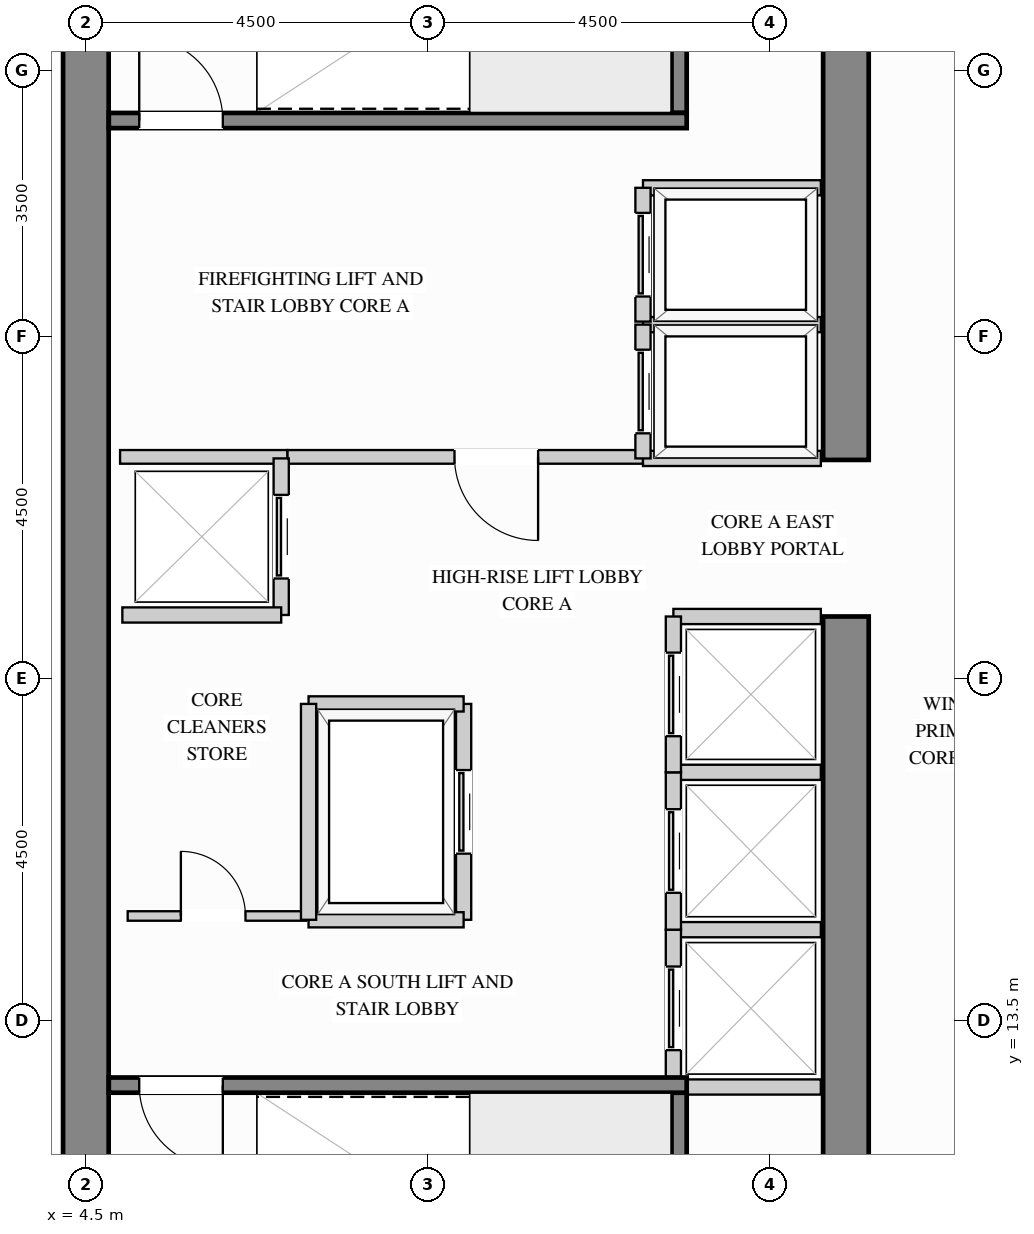
"""IFC4 building model, lengths in metres.
Left out: names, types, materials, properties, quantities, classifications, styles, units other than length and angle.
Written with IfcOpenShell. Run it as: python <this file> out.ifc"""

import sys

from ifc_helpers import new_model, si_unit, direction, frame, frame_2d, origin, place, context, subcontext, project, spatial, rectangle, extrude, source, transform, mapped, element, fill, save


model = new_model("IFC4")
c1 = context("Model", 3, precision=1e-05, world=origin(), true_north=direction((0.0, 1.0)))
c2 = subcontext(c1, "Body", "Model", "MODEL_VIEW")
j1 = project(units=[si_unit("LENGTHUNIT", "METRE"), si_unit("PLANEANGLEUNIT", "RADIAN")], contexts=[c1])
p1 = place(None, origin())
s1 = spatial("IfcSite", under=j1, at=p1, CompositionType="ELEMENT")
p2 = place(p1, origin())
s2 = spatial("IfcBuilding", under=s1, at=p2, CompositionType="ELEMENT")
p3 = place(p2, frame((0.0, 0.0, 157.5)))
s3 = spatial("IfcBuildingStorey", under=s2, at=p3, CompositionType="ELEMENT", Elevation=157.5)
m1 = source(origin(), c2, "Body", "SweptSolid", [
    extrude(rectangle(XDim=10.02, YDim=0.6, at=frame_2d((5.01, 0.0))), origin(), (0.0, 0.0, 1.0), 3.4),
])
p4 = place(p3, frame((14.5, 8.8, 0.0), z_axis=(0.0, 0.0, 1.0), x_axis=(0.0, 1.0, 0.0)))
e1 = element("IfcWall", 1, at=p4, inside=s3, PredefinedType="SHEAR", context=c2, shape_type="MappedRepresentation", body=[
    mapped(m1, transform((0.0, 0.0, 0.0), x_axis=(1.0, 0.0, 0.0), y_axis=(0.0, 1.0, 0.0), z_axis=(0.0, 0.0, 1.0))),
])
m2 = source(origin(), c2, "Body", "SweptSolid", [
    extrude(rectangle(XDim=8.32, YDim=0.6, at=frame_2d((4.16, 0.0))), origin(), (0.0, 0.0, 1.0), 3.4),
])
p5 = place(p3, frame((14.5, 20.88, 0.0), z_axis=(0.0, 0.0, 1.0), x_axis=(0.0, 1.0, 0.0)))
e2 = element("IfcWall", 2, at=p5, inside=s3, PredefinedType="SHEAR", context=c2, shape_type="MappedRepresentation", body=[
    mapped(m2, transform((0.0, 0.0, 0.0), x_axis=(1.0, 0.0, 0.0), y_axis=(0.0, 1.0, 0.0), z_axis=(0.0, 0.0, 1.0))),
])
m3 = source(origin(), c2, "Body", "SweptSolid", [
    extrude(rectangle(XDim=20.4, YDim=0.6, at=frame_2d((10.2, 0.0))), origin(), (0.0, 0.0, 1.0), 3.4),
])
p6 = place(p3, frame((4.5, 8.8, 0.0), z_axis=(0.0, 0.0, 1.0), x_axis=(0.0, 1.0, 0.0)))
e3 = element("IfcWall", 3, at=p6, inside=s3, PredefinedType="SHEAR", context=c2, shape_type="MappedRepresentation", body=[
    mapped(m3, transform((0.0, 0.0, 0.0), x_axis=(1.0, 0.0, 0.0), y_axis=(0.0, 1.0, 0.0), z_axis=(0.0, 0.0, 1.0))),
])
p7 = place(p3, frame((7.15, 20.92, 0.0), z_axis=(0.0, 0.0, 1.0), x_axis=(1.0, 0.0, 0.0)))
e4 = element("IfcWall", 4, at=p7, inside=s3, PredefinedType="PARTITIONING", context=c2, shape_type="SweptSolid", body=[
    extrude(rectangle(XDim=4.68, YDim=0.18, at=frame_2d((2.34, 0.0))), origin(), (0.0, 0.0, 1.0), 3.385),
])
p8 = place(p7, frame((2.2, 0.0, 0.0)))
e5 = element("IfcOpeningElement", 5, at=p8, cuts=e4, PredefinedType="OPENING", context=c2, shape_type="SweptSolid", body=[
    extrude(rectangle(XDim=1.1, YDim=2.15, at=frame_2d((0.55, 1.075))), frame((0.0, 0.1, 0.0), z_axis=(0.0, -1.0, 0.0), x_axis=(1.0, 0.0, 0.0)), (0.0, 0.0, 1.0), 0.2),
])
m4 = source(origin(), c2, "Body", "SweptSolid", [
    extrude(rectangle(XDim=2.2, YDim=0.18, at=frame_2d((1.1, 0.0))), origin(), (0.0, 0.0, 1.0), 3.385),
])
p9 = place(p3, frame((4.95, 20.92, 0.0), z_axis=(0.0, 0.0, 1.0), x_axis=(1.0, 0.0, 0.0)))
e6 = element("IfcWall", 6, at=p9, inside=s3, PredefinedType="PARTITIONING", context=c2, shape_type="MappedRepresentation", body=[
    mapped(m4, transform((0.0, 0.0, 0.0), x_axis=(1.0, 0.0, 0.0), y_axis=(0.0, 1.0, 0.0), z_axis=(0.0, 0.0, 1.0))),
])
p10 = place(p3, frame((5.05, 14.88, 0.0), z_axis=(0.0, 0.0, 1.0), x_axis=(1.0, 0.0, 0.0)))
e7 = element("IfcWall", 7, at=p10, inside=s3, PredefinedType="PARTITIONING", context=c2, shape_type="SweptSolid", body=[
    extrude(rectangle(XDim=2.35, YDim=0.125, at=frame_2d((1.175, 0.0))), origin(), (0.0, 0.0, 1.0), 3.385),
])
p11 = place(p10, frame((0.7, 0.0, 0.0)))
e8 = element("IfcOpeningElement", 8, at=p11, cuts=e7, PredefinedType="OPENING", context=c2, shape_type="SweptSolid", body=[
    extrude(rectangle(XDim=0.85, YDim=2.1, at=frame_2d((0.425, 1.05))), frame((0.0, 0.073, 0.0), z_axis=(0.0, -1.0, 0.0), x_axis=(1.0, 0.0, 0.0)), (0.0, 0.0, 1.0), 0.145),
])
m5 = source(origin(), c2, "Body", "SweptSolid", [
    extrude(rectangle(XDim=2.34, YDim=0.2, at=frame_2d((1.17, 0.0))), origin(), (0.0, 0.0, 1.0), 3.385),
])
for number, where, z_axis, x_axis in (
    (9, (11.83, 22.66, 0.0), (0.0, 0.0, 1.0), (1.0, 0.0, 0.0)),
    (10, (11.83, 20.9, 0.0), (0.0, 0.0, 1.0), (1.0, 0.0, 0.0)),
):
    element("IfcWall", number, at=place(p3, frame(where, z_axis=z_axis, x_axis=x_axis)), inside=s3, PredefinedType="PARTITIONING", context=c2, shape_type="MappedRepresentation", body=[
        mapped(m5, transform((0.0, 0.0, 0.0), x_axis=(1.0, 0.0, 0.0), y_axis=(0.0, 1.0, 0.0), z_axis=(0.0, 0.0, 1.0))),
    ])
p12 = place(p3, frame((11.83, 20.9, 0.0), z_axis=(0.0, 0.0, 1.0), x_axis=(0.0, 1.0, 0.0)))
e11 = element("IfcWall", 11, at=p12, inside=s3, PredefinedType="PARTITIONING", context=c2, shape_type="SweptSolid", body=[
    extrude(rectangle(XDim=1.76, YDim=0.2, at=frame_2d((0.88, 0.0))), origin(), (0.0, 0.0, 1.0), 3.385),
])
p13 = place(p12, frame((0.33, 0.0, 0.0)))
e12 = element("IfcOpeningElement", 12, at=p13, cuts=e11, PredefinedType="OPENING", context=c2, shape_type="SweptSolid", body=[
    extrude(rectangle(XDim=1.1, YDim=2.2, at=frame_2d((0.55, 1.1))), frame((0.0, 0.11, 0.0), z_axis=(0.0, -1.0, 0.0), x_axis=(1.0, 0.0, 0.0)), (0.0, 0.0, 1.0), 0.22),
])
p14 = place(p3, frame((11.83, 24.46, 0.0), z_axis=(0.0, 0.0, 1.0), x_axis=(1.0, 0.0, 0.0)))
e13 = element("IfcWall", 13, at=p14, inside=s3, PredefinedType="PARTITIONING", context=c2, shape_type="MappedRepresentation", body=[
    mapped(m5, transform((0.0, 0.0, 0.0), x_axis=(1.0, 0.0, 0.0), y_axis=(0.0, 1.0, 0.0), z_axis=(0.0, 0.0, 1.0))),
])
p15 = place(p3, frame((11.83, 22.7, 0.0), z_axis=(0.0, 0.0, 1.0), x_axis=(0.0, 1.0, 0.0)))
e14 = element("IfcWall", 14, at=p15, inside=s3, PredefinedType="PARTITIONING", context=c2, shape_type="SweptSolid", body=[
    extrude(rectangle(XDim=1.76, YDim=0.2, at=frame_2d((0.88, 0.0))), origin(), (0.0, 0.0, 1.0), 3.385),
])
p16 = place(p15, frame((0.33, 0.0, 0.0)))
e15 = element("IfcOpeningElement", 15, at=p16, cuts=e14, PredefinedType="OPENING", context=c2, shape_type="SweptSolid", body=[
    extrude(rectangle(XDim=1.1, YDim=2.2, at=frame_2d((0.55, 1.1))), frame((0.0, 0.11, 0.0), z_axis=(0.0, -1.0, 0.0), x_axis=(1.0, 0.0, 0.0)), (0.0, 0.0, 1.0), 0.22),
])
m6 = source(origin(), c2, "Body", "SweptSolid", [
    extrude(rectangle(XDim=1.94, YDim=0.2, at=frame_2d((0.97, 0.0))), origin(), (0.0, 0.0, 1.0), 3.385),
])
for number, where, z_axis, x_axis in (
    (16, (12.23, 14.7, 0.0), (0.0, 0.0, 1.0), (1.0, 0.0, 0.0)),
    (17, (12.23, 12.63, 0.0), (0.0, 0.0, 1.0), (1.0, 0.0, 0.0)),
):
    element("IfcWall", number, at=place(p3, frame(where, z_axis=z_axis, x_axis=x_axis)), inside=s3, PredefinedType="PARTITIONING", context=c2, shape_type="MappedRepresentation", body=[
        mapped(m6, transform((0.0, 0.0, 0.0), x_axis=(1.0, 0.0, 0.0), y_axis=(0.0, 1.0, 0.0), z_axis=(0.0, 0.0, 1.0))),
    ])
p17 = place(p3, frame((12.23, 12.63, 0.0), z_axis=(0.0, 0.0, 1.0), x_axis=(0.0, 1.0, 0.0)))
e18 = element("IfcWall", 18, at=p17, inside=s3, PredefinedType="PARTITIONING", context=c2, shape_type="SweptSolid", body=[
    extrude(rectangle(XDim=2.07, YDim=0.2, at=frame_2d((1.035, 0.0))), origin(), (0.0, 0.0, 1.0), 3.385),
])
p18 = place(p17, frame((0.485, 0.0, 0.0)))
e19 = element("IfcOpeningElement", 19, at=p18, cuts=e18, PredefinedType="OPENING", context=c2, shape_type="SweptSolid", body=[
    extrude(rectangle(XDim=1.1, YDim=2.2, at=frame_2d((0.55, 1.1))), frame((0.0, 0.11, 0.0), z_axis=(0.0, -1.0, 0.0), x_axis=(1.0, 0.0, 0.0)), (0.0, 0.0, 1.0), 0.22),
])
p19 = place(p3, frame((12.23, 16.77, 0.0), z_axis=(0.0, 0.0, 1.0), x_axis=(1.0, 0.0, 0.0)))
e20 = element("IfcWall", 20, at=p19, inside=s3, PredefinedType="PARTITIONING", context=c2, shape_type="MappedRepresentation", body=[
    mapped(m6, transform((0.0, 0.0, 0.0), x_axis=(1.0, 0.0, 0.0), y_axis=(0.0, 1.0, 0.0), z_axis=(0.0, 0.0, 1.0))),
])
p20 = place(p3, frame((12.23, 14.7, 0.0), z_axis=(0.0, 0.0, 1.0), x_axis=(0.0, 1.0, 0.0)))
e21 = element("IfcWall", 21, at=p20, inside=s3, PredefinedType="PARTITIONING", context=c2, shape_type="SweptSolid", body=[
    extrude(rectangle(XDim=2.07, YDim=0.2, at=frame_2d((1.035, 0.0))), origin(), (0.0, 0.0, 1.0), 3.385),
])
p21 = place(p20, frame((0.485, 0.0, 0.0)))
e22 = element("IfcOpeningElement", 22, at=p21, cuts=e21, PredefinedType="OPENING", context=c2, shape_type="SweptSolid", body=[
    extrude(rectangle(XDim=1.1, YDim=2.2, at=frame_2d((0.55, 1.1))), frame((0.0, 0.11, 0.0), z_axis=(0.0, -1.0, 0.0), x_axis=(1.0, 0.0, 0.0)), (0.0, 0.0, 1.0), 0.22),
])
p22 = place(p3, frame((12.23, 18.82, 0.0), z_axis=(0.0, 0.0, 1.0), x_axis=(1.0, 0.0, 0.0)))
e23 = element("IfcWall", 23, at=p22, inside=s3, PredefinedType="PARTITIONING", context=c2, shape_type="MappedRepresentation", body=[
    mapped(m6, transform((0.0, 0.0, 0.0), x_axis=(1.0, 0.0, 0.0), y_axis=(0.0, 1.0, 0.0), z_axis=(0.0, 0.0, 1.0))),
])
p23 = place(p3, frame((12.23, 16.77, 0.0), z_axis=(0.0, 0.0, 1.0), x_axis=(0.0, 1.0, 0.0)))
e24 = element("IfcWall", 24, at=p23, inside=s3, PredefinedType="PARTITIONING", context=c2, shape_type="SweptSolid", body=[
    extrude(rectangle(XDim=2.05, YDim=0.2, at=frame_2d((1.025, 0.0))), origin(), (0.0, 0.0, 1.0), 3.385),
])
p24 = place(p23, frame((0.475, 0.0, 0.0)))
e25 = element("IfcOpeningElement", 25, at=p24, cuts=e24, PredefinedType="OPENING", context=c2, shape_type="SweptSolid", body=[
    extrude(rectangle(XDim=1.1, YDim=2.2, at=frame_2d((0.55, 1.1))), frame((0.0, 0.11, 0.0), z_axis=(0.0, -1.0, 0.0), x_axis=(1.0, 0.0, 0.0)), (0.0, 0.0, 1.0), 0.22),
])
p25 = place(p3, frame((7.07, 18.84, 0.0), z_axis=(0.0, 0.0, 1.0), x_axis=(0.0, 1.0, 0.0)))
e26 = element("IfcWall", 26, at=p25, inside=s3, PredefinedType="PARTITIONING", context=c2, shape_type="SweptSolid", body=[
    extrude(rectangle(XDim=2.06, YDim=0.2, at=frame_2d((1.03, 0.0))), origin(), (0.0, 0.0, 1.0), 3.385),
])
p26 = place(p25, frame((0.48, 0.0, 0.0)))
e27 = element("IfcOpeningElement", 27, at=p26, cuts=e26, PredefinedType="OPENING", context=c2, shape_type="SweptSolid", body=[
    extrude(rectangle(XDim=1.1, YDim=2.2, at=frame_2d((0.55, 1.1))), frame((0.0, 0.11, 0.0), z_axis=(0.0, -1.0, 0.0), x_axis=(1.0, 0.0, 0.0)), (0.0, 0.0, 1.0), 0.22),
])
m7 = source(origin(), c2, "Body", "SweptSolid", [
    extrude(rectangle(XDim=2.09, YDim=0.2, at=frame_2d((1.045, 0.0))), origin(), (0.0, 0.0, 1.0), 3.385),
])
p27 = place(p3, frame((4.98, 18.84, 0.0), z_axis=(0.0, 0.0, 1.0), x_axis=(1.0, 0.0, 0.0)))
e28 = element("IfcWall", 28, at=p27, inside=s3, PredefinedType="PARTITIONING", context=c2, shape_type="MappedRepresentation", body=[
    mapped(m7, transform((0.0, 0.0, 0.0), x_axis=(1.0, 0.0, 0.0), y_axis=(0.0, 1.0, 0.0), z_axis=(0.0, 0.0, 1.0))),
])
p28 = place(p3, frame((9.47, 14.83, 0.0), z_axis=(0.0, 0.0, 1.0), x_axis=(0.0, 1.0, 0.0)))
e29 = element("IfcWall", 29, at=p28, inside=s3, PredefinedType="PARTITIONING", context=c2, shape_type="SweptSolid", body=[
    extrude(rectangle(XDim=2.84, YDim=0.2, at=frame_2d((1.42, 0.0))), origin(), (0.0, 0.0, 1.0), 3.385),
])
p29 = place(p28, frame((0.87, 0.0, 0.0)))
e30 = element("IfcOpeningElement", 30, at=p29, cuts=e29, PredefinedType="OPENING", context=c2, shape_type="SweptSolid", body=[
    extrude(rectangle(XDim=1.1, YDim=2.2, at=frame_2d((0.55, 1.1))), frame((0.0, 0.11, 0.0), z_axis=(0.0, -1.0, 0.0), x_axis=(1.0, 0.0, 0.0)), (0.0, 0.0, 1.0), 0.22),
])
m8 = source(origin(), c2, "Body", "SweptSolid", [
    extrude(rectangle(XDim=2.04, YDim=0.2, at=frame_2d((1.02, 0.0))), origin(), (0.0, 0.0, 1.0), 3.385),
])
for number, where, z_axis, x_axis in (
    (31, (7.43, 17.67, 0.0), (0.0, 0.0, 1.0), (1.0, 0.0, 0.0)),
    (32, (7.43, 14.83, 0.0), (0.0, 0.0, 1.0), (1.0, 0.0, 0.0)),
):
    element("IfcWall", number, at=place(p3, frame(where, z_axis=z_axis, x_axis=x_axis)), inside=s3, PredefinedType="PARTITIONING", context=c2, shape_type="MappedRepresentation", body=[
        mapped(m8, transform((0.0, 0.0, 0.0), x_axis=(1.0, 0.0, 0.0), y_axis=(0.0, 1.0, 0.0), z_axis=(0.0, 0.0, 1.0))),
    ])
m9 = source(origin(), c2, "Body", "SweptSolid", [
    extrude(rectangle(XDim=2.84, YDim=0.2, at=frame_2d((1.42, 0.0))), origin(), (0.0, 0.0, 1.0), 3.385),
])
p30 = place(p3, frame((7.43, 14.83, 0.0), z_axis=(0.0, 0.0, 1.0), x_axis=(0.0, 1.0, 0.0)))
e33 = element("IfcWall", 33, at=p30, inside=s3, PredefinedType="PARTITIONING", context=c2, shape_type="MappedRepresentation", body=[
    mapped(m9, transform((0.0, 0.0, 0.0), x_axis=(1.0, 0.0, 0.0), y_axis=(0.0, 1.0, 0.0), z_axis=(0.0, 0.0, 1.0))),
])
m10 = source(origin(), c2, "Body", "SweptSolid", [
    extrude(rectangle(XDim=3.753, YDim=0.2, at=frame_2d((1.876, 0.0))), origin(), (0.0, 0.0, 1.0), 3.4),
])
p31 = place(p3, frame((12.305, 8.802, 0.0), z_axis=(0.0, 0.0, 1.0), x_axis=(0.0, 1.0, 0.0)))
e34 = element("IfcWall", 34, at=p31, inside=s3, PredefinedType="SHEAR", context=c2, shape_type="MappedRepresentation", body=[
    mapped(m10, transform((0.0, 0.0, 0.0), x_axis=(1.0, 0.0, 0.0), y_axis=(0.0, 1.0, 0.0), z_axis=(0.0, 0.0, 1.0))),
])
p32 = place(p3, frame((4.802, 12.655, 0.0), z_axis=(0.0, 0.0, 1.0), x_axis=(1.0, 0.0, 0.0)))
e35 = element("IfcWall", 35, at=p32, inside=s3, PredefinedType="SHEAR", context=c2, shape_type="SweptSolid", body=[
    extrude(rectangle(XDim=7.603, YDim=0.2, at=frame_2d((3.802, 0.0))), origin(), (0.0, 0.0, 1.0), 3.4),
])
p33 = place(p32, frame((0.4, 0.0, 0.0)))
e36 = element("IfcOpeningElement", 36, at=p33, cuts=e35, PredefinedType="OPENING", context=c2, shape_type="SweptSolid", body=[
    extrude(rectangle(XDim=1.1, YDim=2.15, at=frame_2d((0.55, 1.075))), frame((0.0, 0.11, 0.0), z_axis=(0.0, -1.0, 0.0), x_axis=(1.0, 0.0, 0.0)), (0.0, 0.0, 1.0), 0.22),
])
p34 = place(p3, frame((12.305, 25.445, 0.0), z_axis=(0.0, 0.0, 1.0), x_axis=(0.0, 1.0, 0.0)))
e37 = element("IfcWall", 37, at=p34, inside=s3, PredefinedType="SHEAR", context=c2, shape_type="MappedRepresentation", body=[
    mapped(m10, transform((0.0, 0.0, 0.0), x_axis=(1.0, 0.0, 0.0), y_axis=(0.0, 1.0, 0.0), z_axis=(0.0, 0.0, 1.0))),
])
p35 = place(p3, frame((4.802, 25.345, 0.0), z_axis=(0.0, 0.0, 1.0), x_axis=(1.0, 0.0, 0.0)))
e38 = element("IfcWall", 38, at=p35, inside=s3, PredefinedType="SHEAR", context=c2, shape_type="SweptSolid", body=[
    extrude(rectangle(XDim=7.603, YDim=0.2, at=frame_2d((3.802, 0.0))), origin(), (0.0, 0.0, 1.0), 3.4),
])
p36 = place(p35, frame((0.4, 0.0, 0.0)))
e39 = element("IfcOpeningElement", 39, at=p36, cuts=e38, PredefinedType="OPENING", context=c2, shape_type="SweptSolid", body=[
    extrude(rectangle(XDim=1.1, YDim=2.15, at=frame_2d((0.55, 1.075))), frame((0.0, 0.11, 0.0), z_axis=(0.0, -1.0, 0.0), x_axis=(1.0, 0.0, 0.0)), (0.0, 0.0, 1.0), 0.22),
])
m11 = source(origin(), c2, "Body", "SweptSolid", [
    extrude(rectangle(XDim=1.1, YDim=2.15, at=frame_2d((0.55, 1.075))), frame((0.0, 0.025, 0.0), z_axis=(0.0, -1.0, 0.0), x_axis=(1.0, 0.0, 0.0)), (0.0, 0.0, 1.0), 0.05),
])
p37 = place(p8, origin())
e40 = element("IfcDoor", 40, at=p37, inside=s3, OperationType="SINGLE_SWING_RIGHT", PredefinedType="DOOR", context=c2, shape_type="MappedRepresentation", body=[
    mapped(m11, transform((0.0, 0.0, 0.0), x_axis=(1.0, 0.0, 0.0), y_axis=(0.0, 1.0, 0.0), z_axis=(0.0, 0.0, 1.0))),
])
fill(e5, e40)
m12 = source(origin(), c2, "Body", "SweptSolid", [
    extrude(rectangle(XDim=1.1, YDim=2.2, at=frame_2d((0.55, 1.1))), frame((0.0, 0.025, 0.0), z_axis=(0.0, -1.0, 0.0), x_axis=(1.0, 0.0, 0.0)), (0.0, 0.0, 1.0), 0.05),
])
p38 = place(p13, origin())
e41 = element("IfcDoor", 41, at=p38, inside=s3, OperationType="SLIDING_TO_LEFT", PredefinedType="DOOR", context=c2, shape_type="MappedRepresentation", body=[
    mapped(m12, transform((0.0, 0.0, 0.0), x_axis=(1.0, 0.0, 0.0), y_axis=(0.0, 1.0, 0.0), z_axis=(0.0, 0.0, 1.0))),
])
fill(e12, e41)
p39 = place(p16, origin())
e42 = element("IfcDoor", 42, at=p39, inside=s3, OperationType="SLIDING_TO_LEFT", PredefinedType="DOOR", context=c2, shape_type="MappedRepresentation", body=[
    mapped(m12, transform((0.0, 0.0, 0.0), x_axis=(1.0, 0.0, 0.0), y_axis=(0.0, 1.0, 0.0), z_axis=(0.0, 0.0, 1.0))),
])
fill(e15, e42)
p40 = place(p18, origin())
e43 = element("IfcDoor", 43, at=p40, inside=s3, OperationType="SLIDING_TO_LEFT", PredefinedType="DOOR", context=c2, shape_type="MappedRepresentation", body=[
    mapped(m12, transform((0.0, 0.0, 0.0), x_axis=(1.0, 0.0, 0.0), y_axis=(0.0, 1.0, 0.0), z_axis=(0.0, 0.0, 1.0))),
])
fill(e19, e43)
p41 = place(p21, origin())
e44 = element("IfcDoor", 44, at=p41, inside=s3, OperationType="SLIDING_TO_LEFT", PredefinedType="DOOR", context=c2, shape_type="MappedRepresentation", body=[
    mapped(m12, transform((0.0, 0.0, 0.0), x_axis=(1.0, 0.0, 0.0), y_axis=(0.0, 1.0, 0.0), z_axis=(0.0, 0.0, 1.0))),
])
fill(e22, e44)
p42 = place(p24, origin())
e45 = element("IfcDoor", 45, at=p42, inside=s3, OperationType="SLIDING_TO_LEFT", PredefinedType="DOOR", context=c2, shape_type="MappedRepresentation", body=[
    mapped(m12, transform((0.0, 0.0, 0.0), x_axis=(1.0, 0.0, 0.0), y_axis=(0.0, 1.0, 0.0), z_axis=(0.0, 0.0, 1.0))),
])
fill(e25, e45)
p43 = place(p26, origin())
e46 = element("IfcDoor", 46, at=p43, inside=s3, OperationType="SLIDING_TO_LEFT", PredefinedType="DOOR", context=c2, shape_type="MappedRepresentation", body=[
    mapped(m12, transform((0.0, 0.0, 0.0), x_axis=(1.0, 0.0, 0.0), y_axis=(0.0, 1.0, 0.0), z_axis=(0.0, 0.0, 1.0))),
])
fill(e27, e46)
p44 = place(p29, origin())
e47 = element("IfcDoor", 47, at=p44, inside=s3, OperationType="SLIDING_TO_LEFT", PredefinedType="DOOR", context=c2, shape_type="MappedRepresentation", body=[
    mapped(m12, transform((0.0, 0.0, 0.0), x_axis=(1.0, 0.0, 0.0), y_axis=(0.0, 1.0, 0.0), z_axis=(0.0, 0.0, 1.0))),
])
fill(e30, e47)
m13 = source(origin(), c2, "Body", "SweptSolid", [
    extrude(rectangle(XDim=0.85, YDim=2.1, at=frame_2d((0.425, 1.05))), frame((0.0, 0.025, 0.0), z_axis=(0.0, -1.0, 0.0), x_axis=(1.0, 0.0, 0.0)), (0.0, 0.0, 1.0), 0.05),
])
p45 = place(p11, origin())
e48 = element("IfcDoor", 48, at=p45, inside=s3, OperationType="SINGLE_SWING_LEFT", PredefinedType="DOOR", context=c2, shape_type="MappedRepresentation", body=[
    mapped(m13, transform((0.0, 0.0, 0.0), x_axis=(1.0, 0.0, 0.0), y_axis=(0.0, 1.0, 0.0), z_axis=(0.0, 0.0, 1.0))),
])
fill(e8, e48)
m14 = source(origin(), c2, "Body", "SweptSolid", [
    extrude(rectangle(XDim=1.1, YDim=2.15, at=frame_2d((0.55, 1.075))), frame((0.0, 0.025, 0.0), z_axis=(0.0, -1.0, 0.0), x_axis=(1.0, 0.0, 0.0)), (0.0, 0.0, 1.0), 0.05),
])
p46 = place(p33, origin())
e49 = element("IfcDoor", 49, at=p46, inside=s3, OperationType="SINGLE_SWING_RIGHT", PredefinedType="DOOR", context=c2, shape_type="MappedRepresentation", body=[
    mapped(m14, transform((0.0, 0.0, 0.0), x_axis=(1.0, 0.0, 0.0), y_axis=(0.0, 1.0, 0.0), z_axis=(0.0, 0.0, 1.0))),
])
fill(e36, e49)
p47 = place(p36, origin())
e50 = element("IfcDoor", 50, at=p47, inside=s3, OperationType="SINGLE_SWING_LEFT", PredefinedType="DOOR", context=c2, shape_type="MappedRepresentation", body=[
    mapped(m14, transform((0.0, 0.0, 0.0), x_axis=(1.0, 0.0, 0.0), y_axis=(0.0, 1.0, 0.0), z_axis=(0.0, 0.0, 1.0))),
])
fill(e39, e50)
save(model, sys.argv[1])
